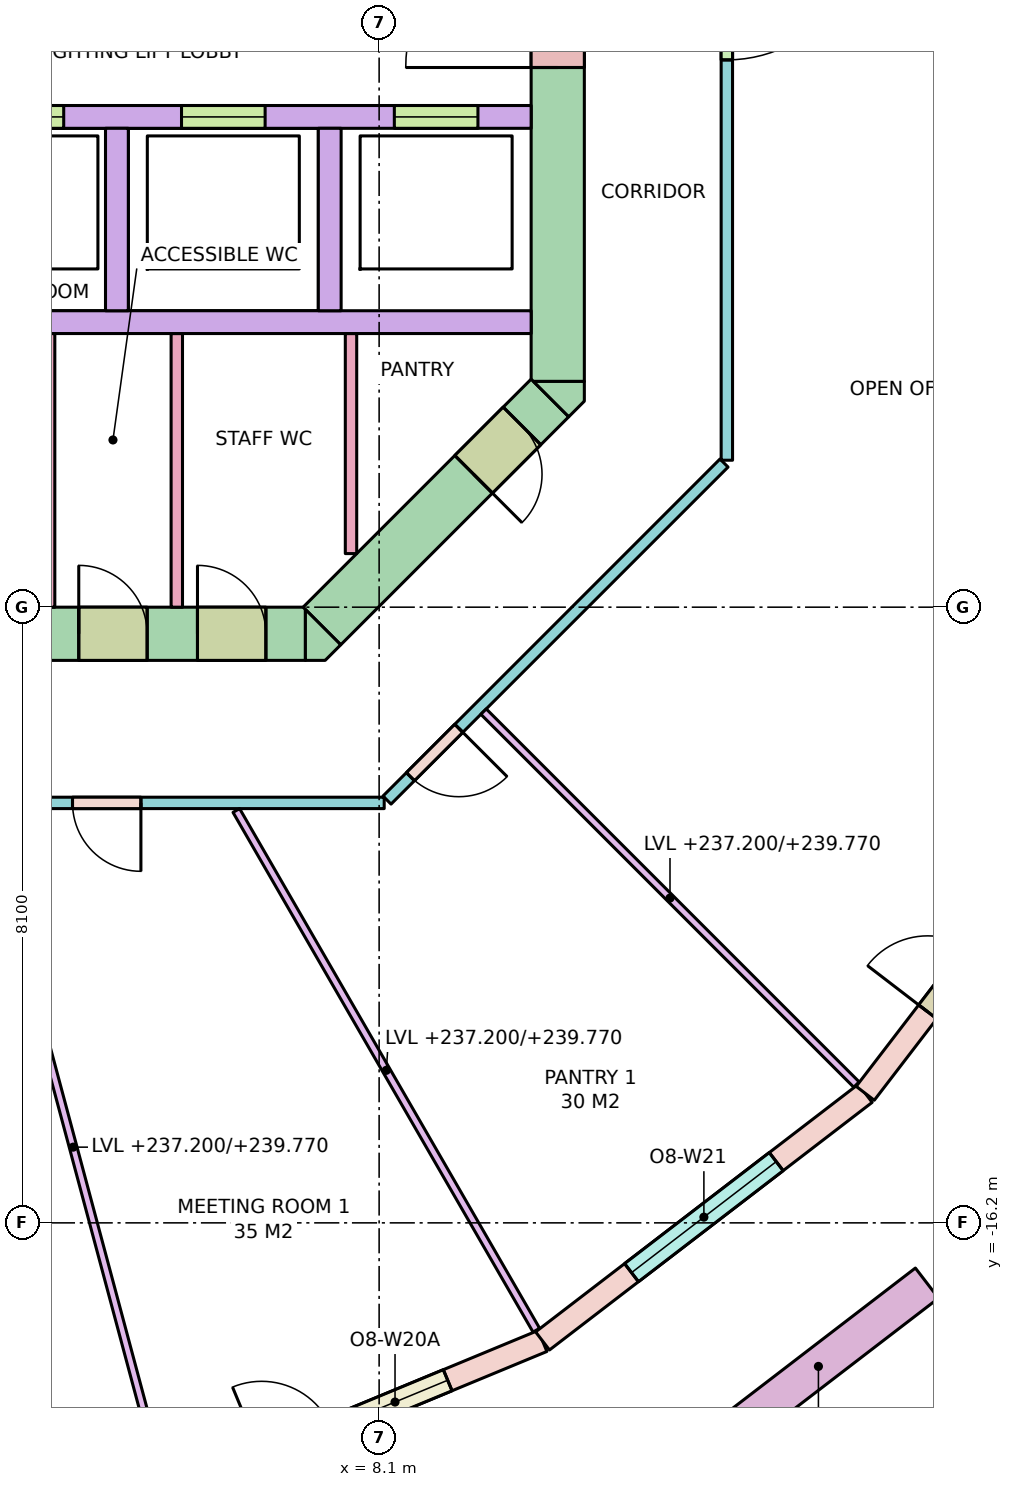
"""IFC4 building model, lengths in metres.
Left out: names, types, materials, properties, quantities, classifications, styles, units other than length and angle.
Written with IfcOpenShell. Run it as: python <this file> out.ifc"""

import sys

from ifc_helpers import new_model, si_unit, direction, frame, frame_2d, origin, place, context, subcontext, project, spatial, polyline, rectangle, outline, extrude, element, fill, save


model = new_model("IFC4")
c1 = context("Model", 3, precision=1e-05, world=origin(), true_north=direction((0.0, 1.0)))
c2 = subcontext(c1, "Body", "Model", "MODEL_VIEW")
j1 = project(units=[si_unit("LENGTHUNIT", "METRE"), si_unit("PLANEANGLEUNIT", "RADIAN")], contexts=[c1])
p1 = place(None, origin())
s1 = spatial("IfcSite", under=j1, at=p1, CompositionType="ELEMENT")
p2 = place(p1, origin())
s2 = spatial("IfcBuilding", under=s1, at=p2, CompositionType="ELEMENT")
p3 = place(p2, frame((0.0, 0.0, 237.2)))
s3 = spatial("IfcBuildingStorey", under=s2, at=p3, CompositionType="ELEMENT", Elevation=237.2)
p4 = place(p3, frame((-7.13, -8.45, -0.28), z_axis=(0.0, 0.0, 1.0), x_axis=(1.0, 0.0, 0.0)))
e1 = element("IfcWall", 1, at=p4, inside=s3, PredefinedType="SHEAR", context=c2, shape_type="SweptSolid", body=[
    extrude(rectangle(XDim=14.26, YDim=0.7, at=frame_2d((7.13, 0.0))), origin(), (0.0, 0.0, 1.0), 3.7),
])
p5 = place(p4, frame((8.08, 0.0, 0.28)))
e2 = element("IfcOpeningElement", 2, at=p5, cuts=e1, PredefinedType="OPENING", context=c2, shape_type="SweptSolid", body=[
    extrude(rectangle(XDim=0.7, YDim=2.1, at=frame_2d((0.35, 1.05))), frame((0.0, 0.36, 0.0), z_axis=(0.0, -1.0, 0.0), x_axis=(1.0, 0.0, 0.0)), (0.0, 0.0, 1.0), 0.72),
])
p6 = place(p4, frame((6.205, 0.0, 0.28)))
e3 = element("IfcOpeningElement", 3, at=p6, cuts=e1, PredefinedType="OPENING", context=c2, shape_type="SweptSolid", body=[
    extrude(rectangle(XDim=0.9, YDim=2.1, at=frame_2d((0.45, 1.05))), frame((0.0, 0.36, 0.0), z_axis=(0.0, -1.0, 0.0), x_axis=(1.0, 0.0, 0.0)), (0.0, 0.0, 1.0), 0.72),
])
p7 = place(p4, frame((9.521, 0.0, 0.28)))
e4 = element("IfcOpeningElement", 4, at=p7, cuts=e1, PredefinedType="OPENING", context=c2, shape_type="SweptSolid", body=[
    extrude(rectangle(XDim=0.9, YDim=2.1, at=frame_2d((0.45, 1.05))), frame((0.0, 0.36, 0.0), z_axis=(0.0, -1.0, 0.0), x_axis=(1.0, 0.0, 0.0)), (0.0, 0.0, 1.0), 0.72),
])
p8 = place(p4, frame((11.278, 0.0, 0.28)))
e5 = element("IfcOpeningElement", 5, at=p8, cuts=e1, PredefinedType="OPENING", context=c2, shape_type="SweptSolid", body=[
    extrude(rectangle(XDim=0.9, YDim=2.1, at=frame_2d((0.45, 1.05))), frame((0.0, 0.36, 0.0), z_axis=(0.0, -1.0, 0.0), x_axis=(1.0, 0.0, 0.0)), (0.0, 0.0, 1.0), 0.72),
])
p9 = place(p4, frame((12.84, 0.0, 0.28)))
e6 = element("IfcOpeningElement", 6, at=p9, cuts=e1, PredefinedType="OPENING", context=c2, shape_type="SweptSolid", body=[
    extrude(rectangle(XDim=0.9, YDim=2.1, at=frame_2d((0.45, 1.05))), frame((0.0, 0.36, 0.0), z_axis=(0.0, -1.0, 0.0), x_axis=(1.0, 0.0, 0.0)), (0.0, 0.0, 1.0), 0.72),
])
p10 = place(p3, frame((10.45, -5.13, -0.28), z_axis=(0.0, 0.0, 1.0), x_axis=(0.0, 1.0, 0.0)))
e7 = element("IfcWall", 7, at=p10, inside=s3, PredefinedType="SHEAR", context=c2, shape_type="SweptSolid", body=[
    extrude(rectangle(XDim=10.26, YDim=0.7, at=frame_2d((5.13, 0.0))), origin(), (0.0, 0.0, 1.0), 3.7),
])
p11 = place(p10, frame((4.13, 0.0, 0.28)))
e8 = element("IfcOpeningElement", 8, at=p11, cuts=e7, PredefinedType="OPENING", context=c2, shape_type="SweptSolid", body=[
    extrude(rectangle(XDim=2.0, YDim=2.1, at=frame_2d((1.0, 1.05))), frame((0.0, 0.36, 0.0), z_axis=(0.0, -1.0, 0.0), x_axis=(1.0, 0.0, 0.0)), (0.0, 0.0, 1.0), 0.72),
])
p12 = place(p3, frame((10.347, -5.347, -0.28), z_axis=(0.0, 0.0, 1.0), x_axis=(-0.707106781187, -0.707106781187, 0.0)))
e9 = element("IfcWall", 9, at=p12, inside=s3, PredefinedType="SHEAR", context=c2, shape_type="SweptSolid", body=[
    extrude(rectangle(XDim=4.243, YDim=0.7, at=frame_2d((2.121, 0.0))), origin(), (0.0, 0.0, 1.0), 3.7),
])
p13 = place(p12, frame((0.52, 0.0, 0.28)))
e10 = element("IfcOpeningElement", 10, at=p13, cuts=e9, PredefinedType="OPENING", context=c2, shape_type="SweptSolid", body=[
    extrude(rectangle(XDim=0.9, YDim=2.1, at=frame_2d((0.45, 1.05))), frame((0.0, 0.36, 0.0), z_axis=(0.0, -1.0, 0.0), x_axis=(1.0, 0.0, 0.0)), (0.0, 0.0, 1.0), 0.72),
])
p14 = place(p3, frame((0.0, 0.0, -0.28)))
e11 = element("IfcWall", 11, at=p14, inside=s3, PredefinedType="SHEAR", context=c2, shape_type="SweptSolid", body=[
    extrude(outline(polyline([(7.39, -8.8), (7.13, -8.8), (7.13, -8.8), (7.13, -8.13), (7.595, -8.595), (7.595, -8.595), (7.595, -8.595), (7.39, -8.8)])), origin(), (0.0, 0.0, 1.0), 3.7),
])
p15 = place(p3, frame((0.0, 0.0, -0.28)))
e12 = element("IfcWall", 12, at=p15, inside=s3, PredefinedType="SHEAR", context=c2, shape_type="SweptSolid", body=[
    extrude(outline(polyline([(10.8, -5.39), (10.595, -5.595), (10.595, -5.595), (10.595, -5.595), (10.13, -5.13), (10.8, -5.13), (10.8, -5.13), (10.8, -5.39)])), origin(), (0.0, 0.0, 1.0), 3.7),
])
p16 = place(p3, frame((2.0, -4.35, 0.0), z_axis=(0.0, 0.0, 1.0), x_axis=(1.0, 0.0, 0.0)))
e13 = element("IfcWall", 13, at=p16, inside=s3, PredefinedType="SOLIDWALL", context=c2, shape_type="SweptSolid", body=[
    extrude(rectangle(XDim=8.1, YDim=0.3, at=frame_2d((4.05, 0.0))), origin(), (0.0, 0.0, 1.0), 3.42),
])
p17 = place(p3, frame((2.0, -1.65, 0.0), z_axis=(0.0, 0.0, 1.0), x_axis=(1.0, 0.0, 0.0)))
e14 = element("IfcWall", 14, at=p17, inside=s3, PredefinedType="SOLIDWALL", context=c2, shape_type="SweptSolid", body=[
    extrude(rectangle(XDim=8.1, YDim=0.3, at=frame_2d((4.05, 0.0))), origin(), (0.0, 0.0, 1.0), 3.42),
])
p18 = place(p17, frame((0.85, 0.0, 0.0)))
e15 = element("IfcOpeningElement", 15, at=p18, cuts=e14, PredefinedType="OPENING", context=c2, shape_type="SweptSolid", body=[
    extrude(rectangle(XDim=1.1, YDim=2.1, at=frame_2d((0.55, 1.05))), frame((0.0, 0.16, 0.0), z_axis=(0.0, -1.0, 0.0), x_axis=(1.0, 0.0, 0.0)), (0.0, 0.0, 1.0), 0.32),
])
p19 = place(p17, frame((3.5, 0.0, 0.0)))
e16 = element("IfcOpeningElement", 16, at=p19, cuts=e14, PredefinedType="OPENING", context=c2, shape_type="SweptSolid", body=[
    extrude(rectangle(XDim=1.1, YDim=2.1, at=frame_2d((0.55, 1.05))), frame((0.0, 0.16, 0.0), z_axis=(0.0, -1.0, 0.0), x_axis=(1.0, 0.0, 0.0)), (0.0, 0.0, 1.0), 0.32),
])
p20 = place(p17, frame((6.3, 0.0, 0.0)))
e17 = element("IfcOpeningElement", 17, at=p20, cuts=e14, PredefinedType="OPENING", context=c2, shape_type="SweptSolid", body=[
    extrude(rectangle(XDim=1.1, YDim=2.1, at=frame_2d((0.55, 1.05))), frame((0.0, 0.16, 0.0), z_axis=(0.0, -1.0, 0.0), x_axis=(1.0, 0.0, 0.0)), (0.0, 0.0, 1.0), 0.32),
])
for number, where, z_axis, x_axis in (
    (18, (4.65, -4.2, 0.0), (0.0, 0.0, 1.0), (0.0, 1.0, 0.0)),
    (19, (7.45, -4.2, 0.0), (0.0, 0.0, 1.0), (0.0, 1.0, 0.0)),
):
    element("IfcWall", number, at=place(p3, frame(where, z_axis=z_axis, x_axis=x_axis)), inside=s3, PredefinedType="SOLIDWALL", context=c2, shape_type="SweptSolid", body=[
        extrude(rectangle(XDim=2.4, YDim=0.3, at=frame_2d((1.2, 0.0))), origin(), (0.0, 0.0, 1.0), 3.42),
    ])
p21 = place(p3, frame((5.306, -19.802, 0.0), z_axis=(0.0, 0.0, 1.0), x_axis=(0.923867255172, 0.382713071139, 0.0)))
e20 = element("IfcWall", 20, at=p21, inside=s3, PredefinedType="STANDARD", context=c2, shape_type="SweptSolid", body=[
    extrude(rectangle(XDim=5.352, YDim=0.3, at=frame_2d((2.676, 0.0))), origin(), (0.0, 0.0, 1.0), 3.42),
])
p22 = place(p21, frame((1.351, 0.0, 0.0)))
e21 = element("IfcOpeningElement", 21, at=p22, cuts=e20, PredefinedType="OPENING", context=c2, shape_type="SweptSolid", body=[
    extrude(rectangle(XDim=1.0, YDim=2.4, at=frame_2d((0.5, 1.2))), frame((0.0, 0.16, 0.0), z_axis=(0.0, -1.0, 0.0), x_axis=(1.0, 0.0, 0.0)), (0.0, 0.0, 1.0), 0.32),
])
p23 = place(p21, frame((2.501, 0.0, 0.8)))
e22 = element("IfcOpeningElement", 22, at=p23, cuts=e20, PredefinedType="OPENING", context=c2, shape_type="SweptSolid", body=[
    extrude(rectangle(XDim=1.5, YDim=2.4, at=frame_2d((0.75, 1.2))), frame((0.0, 0.16, 0.0), z_axis=(0.0, -1.0, 0.0), x_axis=(1.0, 0.0, 0.0)), (0.0, 0.0, 1.0), 0.32),
])
p24 = place(p3, frame((10.25, -17.753, 0.0), z_axis=(0.0, 0.0, 1.0), x_axis=(0.793349293227, 0.60876670321, 0.0)))
e23 = element("IfcWall", 23, at=p24, inside=s3, PredefinedType="STANDARD", context=c2, shape_type="SweptSolid", body=[
    extrude(rectangle(XDim=5.352, YDim=0.3, at=frame_2d((2.676, 0.0))), origin(), (0.0, 0.0, 1.0), 3.42),
])
p25 = place(p24, frame((1.476, 0.0, 0.8)))
e24 = element("IfcOpeningElement", 24, at=p25, cuts=e23, PredefinedType="OPENING", context=c2, shape_type="SweptSolid", body=[
    extrude(rectangle(XDim=2.4, YDim=2.4, at=frame_2d((1.2, 1.2))), frame((0.0, 0.16, 0.0), z_axis=(0.0, -1.0, 0.0), x_axis=(1.0, 0.0, 0.0)), (0.0, 0.0, 1.0), 0.32),
])
p26 = place(p3, frame((14.496, -14.496, 0.0), z_axis=(0.0, 0.0, 1.0), x_axis=(0.60876670321, 0.793349293227, 0.0)))
e25 = element("IfcWall", 25, at=p26, inside=s3, PredefinedType="STANDARD", context=c2, shape_type="SweptSolid", body=[
    extrude(rectangle(XDim=5.352, YDim=0.3, at=frame_2d((2.676, 0.0))), origin(), (0.0, 0.0, 1.0), 3.42),
])
p27 = place(p26, frame((1.351, 0.0, 0.0)))
e26 = element("IfcOpeningElement", 26, at=p27, cuts=e25, PredefinedType="OPENING", context=c2, shape_type="SweptSolid", body=[
    extrude(rectangle(XDim=1.0, YDim=2.4, at=frame_2d((0.5, 1.2))), frame((0.0, 0.16, 0.0), z_axis=(0.0, -1.0, 0.0), x_axis=(1.0, 0.0, 0.0)), (0.0, 0.0, 1.0), 0.32),
])
p28 = place(p26, frame((2.501, 0.0, 0.8)))
e27 = element("IfcOpeningElement", 27, at=p28, cuts=e25, PredefinedType="OPENING", context=c2, shape_type="SweptSolid", body=[
    extrude(rectangle(XDim=1.5, YDim=2.4, at=frame_2d((0.75, 1.2))), frame((0.0, 0.16, 0.0), z_axis=(0.0, -1.0, 0.0), x_axis=(1.0, 0.0, 0.0)), (0.0, 0.0, 1.0), 0.32),
])
p29 = place(p3, frame((12.452, -19.184, 0.0), z_axis=(0.0, 0.0, 1.0), x_axis=(0.793384730612, 0.608720518162, 0.0)))
e28 = element("IfcWall", 28, at=p29, inside=s3, PredefinedType="PARAPET", context=c2, shape_type="SweptSolid", body=[
    extrude(rectangle(XDim=3.6, YDim=0.5, at=frame_2d((1.8, 0.0))), origin(), (0.0, 0.0, 1.0), 0.9),
])
for number, where, z_axis, x_axis in (
    (29, (3.758, -8.1, 0.0), (0.0, 0.0, 1.0), (0.0, 1.0, 0.0)),
    (30, (5.438, -8.1, 0.0), (0.0, 0.0, 1.0), (0.0, 1.0, 0.0)),
):
    element("IfcWall", number, at=place(p3, frame(where, z_axis=z_axis, x_axis=x_axis)), inside=s3, PredefinedType="PARTITIONING", context=c2, shape_type="SweptSolid", body=[
        extrude(rectangle(XDim=3.6, YDim=0.15, at=frame_2d((1.8, 0.0))), origin(), (0.0, 0.0, 1.0), 3.42),
    ])
p30 = place(p3, frame((7.73, -7.395, 0.0), z_axis=(0.0, 0.0, 1.0), x_axis=(0.0, 1.0, 0.0)))
e31 = element("IfcWall", 31, at=p30, inside=s3, PredefinedType="PARTITIONING", context=c2, shape_type="SweptSolid", body=[
    extrude(rectangle(XDim=2.895, YDim=0.15, at=frame_2d((1.448, 0.0))), origin(), (0.0, 0.0, 1.0), 3.42),
])
p31 = place(p3, frame((12.638, -6.204, 0.0), z_axis=(0.0, 0.0, 1.0), x_axis=(-0.707106781187, -0.707106781187, 0.0)))
e32 = element("IfcWall", 32, at=p31, inside=s3, PredefinedType="PARTITIONING", context=c2, shape_type="SweptSolid", body=[
    extrude(rectangle(XDim=6.271, YDim=0.15, at=frame_2d((3.135, 0.0))), origin(), (0.0, 0.0, 1.0), 2.57),
])
p32 = place(p31, frame((4.935, 0.0, 0.0)))
e33 = element("IfcOpeningElement", 33, at=p32, cuts=e32, PredefinedType="OPENING", context=c2, shape_type="SweptSolid", body=[
    extrude(rectangle(XDim=0.9, YDim=2.1, at=frame_2d((0.45, 1.05))), frame((0.0, 0.085, 0.0), z_axis=(0.0, -1.0, 0.0), x_axis=(1.0, 0.0, 0.0)), (0.0, 0.0, 1.0), 0.17),
])
p33 = place(p3, frame((8.167, -10.675, 0.0), z_axis=(0.0, 0.0, 1.0), x_axis=(-1.0, 0.0, 0.0)))
e34 = element("IfcWall", 34, at=p33, inside=s3, PredefinedType="PARTITIONING", context=c2, shape_type="SweptSolid", body=[
    extrude(rectangle(XDim=16.333, YDim=0.15, at=frame_2d((8.167, 0.0))), origin(), (0.0, 0.0, 1.0), 2.57),
])
p34 = place(p33, frame((12.755, 0.0, 0.0)))
e35 = element("IfcOpeningElement", 35, at=p34, cuts=e34, PredefinedType="OPENING", context=c2, shape_type="SweptSolid", body=[
    extrude(rectangle(XDim=1.8, YDim=2.1, at=frame_2d((0.9, 1.05))), frame((0.0, 0.085, 0.0), z_axis=(0.0, -1.0, 0.0), x_axis=(1.0, 0.0, 0.0)), (0.0, 0.0, 1.0), 0.17),
])
p35 = place(p33, frame((9.098, 0.0, 0.0)))
e36 = element("IfcOpeningElement", 36, at=p35, cuts=e34, PredefinedType="OPENING", context=c2, shape_type="SweptSolid", body=[
    extrude(rectangle(XDim=1.0, YDim=2.1, at=frame_2d((0.5, 1.05))), frame((0.0, 0.085, 0.0), z_axis=(0.0, -1.0, 0.0), x_axis=(1.0, 0.0, 0.0)), (0.0, 0.0, 1.0), 0.17),
])
p36 = place(p33, frame((6.285, 0.0, 0.0)))
e37 = element("IfcOpeningElement", 37, at=p36, cuts=e34, PredefinedType="OPENING", context=c2, shape_type="SweptSolid", body=[
    extrude(rectangle(XDim=0.9, YDim=2.1, at=frame_2d((0.45, 1.05))), frame((0.0, 0.085, 0.0), z_axis=(0.0, -1.0, 0.0), x_axis=(1.0, 0.0, 0.0)), (0.0, 0.0, 1.0), 0.17),
])
p37 = place(p33, frame((3.201, 0.0, 0.0)))
e38 = element("IfcOpeningElement", 38, at=p37, cuts=e34, PredefinedType="OPENING", context=c2, shape_type="SweptSolid", body=[
    extrude(rectangle(XDim=0.9, YDim=2.1, at=frame_2d((0.45, 1.05))), frame((0.0, 0.085, 0.0), z_axis=(0.0, -1.0, 0.0), x_axis=(1.0, 0.0, 0.0)), (0.0, 0.0, 1.0), 0.17),
])
p38 = place(p3, frame((12.675, 6.167, 0.0), z_axis=(0.0, 0.0, 1.0), x_axis=(0.0, -1.0, 0.0)))
e39 = element("IfcWall", 39, at=p38, inside=s3, PredefinedType="PARTITIONING", context=c2, shape_type="SweptSolid", body=[
    extrude(rectangle(XDim=12.333, YDim=0.15, at=frame_2d((6.167, 0.0))), origin(), (0.0, 0.0, 1.0), 2.57),
])
p39 = place(p38, frame((5.267, 0.0, 0.0)))
e40 = element("IfcOpeningElement", 40, at=p39, cuts=e39, PredefinedType="OPENING", context=c2, shape_type="SweptSolid", body=[
    extrude(rectangle(XDim=1.8, YDim=2.1, at=frame_2d((0.9, 1.05))), frame((0.0, 0.085, 0.0), z_axis=(0.0, -1.0, 0.0), x_axis=(1.0, 0.0, 0.0)), (0.0, 0.0, 1.0), 0.17),
])
p40 = place(p3, frame((2.884, -10.764, 0.0), z_axis=(0.0, 0.0, 1.0), x_axis=(0.258811310764, -0.965927898666, 0.0)))
e41 = element("IfcWall", 41, at=p40, inside=s3, PredefinedType="PARTITIONING", context=c2, shape_type="SweptSolid", body=[
    extrude(rectangle(XDim=9.193, YDim=0.1, at=frame_2d((4.596, 0.0))), origin(), (0.0, 0.0, 1.0), 2.57),
])
p41 = place(p3, frame((6.221, -10.775, 0.0), z_axis=(0.0, 0.0, 1.0), x_axis=(0.500016891966, -0.866015650984, 0.0)))
e42 = element("IfcWall", 42, at=p41, inside=s3, PredefinedType="PARTITIONING", context=c2, shape_type="SweptSolid", body=[
    extrude(rectangle(XDim=7.895, YDim=0.1, at=frame_2d((3.948, 0.0))), origin(), (0.0, 0.0, 1.0), 2.57),
])
p42 = place(p3, frame((9.474, -9.474, 0.0), z_axis=(0.0, 0.0, 1.0), x_axis=(0.707106781187, -0.707106781187, 0.0)))
e43 = element("IfcWall", 43, at=p42, inside=s3, PredefinedType="PARTITIONING", context=c2, shape_type="SweptSolid", body=[
    extrude(rectangle(XDim=6.938, YDim=0.1, at=frame_2d((3.469, 0.0))), origin(), (0.0, 0.0, 1.0), 2.57),
])
p43 = place(p23, origin())
e44 = element("IfcWindow", 44, at=p43, inside=s3, PartitioningType="SINGLE_PANEL", PredefinedType="WINDOW", context=c2, shape_type="SweptSolid", body=[
    extrude(rectangle(XDim=1.5, YDim=2.4, at=frame_2d((0.75, 1.2))), frame((0.0, 0.03, 0.0), z_axis=(0.0, -1.0, 0.0), x_axis=(1.0, 0.0, 0.0)), (0.0, 0.0, 1.0), 0.06),
])
fill(e22, e44)
p44 = place(p25, origin())
e45 = element("IfcWindow", 45, at=p44, inside=s3, PartitioningType="SINGLE_PANEL", PredefinedType="WINDOW", context=c2, shape_type="SweptSolid", body=[
    extrude(rectangle(XDim=2.4, YDim=2.4, at=frame_2d((1.2, 1.2))), frame((0.0, 0.03, 0.0), z_axis=(0.0, -1.0, 0.0), x_axis=(1.0, 0.0, 0.0)), (0.0, 0.0, 1.0), 0.06),
])
fill(e24, e45)
p45 = place(p27, origin())
e46 = element("IfcDoor", 46, at=p45, inside=s3, OperationType="SINGLE_SWING_LEFT", PredefinedType="DOOR", context=c2, shape_type="SweptSolid", body=[
    extrude(rectangle(XDim=1.0, YDim=2.4, at=frame_2d((0.5, 1.2))), frame((0.0, 0.025, 0.0), z_axis=(0.0, -1.0, 0.0), x_axis=(1.0, 0.0, 0.0)), (0.0, 0.0, 1.0), 0.05),
])
fill(e26, e46)
p46 = place(p18, origin())
e47 = element("IfcDoor", 47, at=p46, inside=s3, OperationType="DOUBLE_DOOR_SLIDING", PredefinedType="DOOR", context=c2, shape_type="SweptSolid", body=[
    extrude(rectangle(XDim=1.1, YDim=2.1, at=frame_2d((0.55, 1.05))), frame((0.0, 0.025, 0.0), z_axis=(0.0, -1.0, 0.0), x_axis=(1.0, 0.0, 0.0)), (0.0, 0.0, 1.0), 0.05),
])
fill(e15, e47)
p47 = place(p19, origin())
e48 = element("IfcDoor", 48, at=p47, inside=s3, OperationType="DOUBLE_DOOR_SLIDING", PredefinedType="DOOR", context=c2, shape_type="SweptSolid", body=[
    extrude(rectangle(XDim=1.1, YDim=2.1, at=frame_2d((0.55, 1.05))), frame((0.0, 0.025, 0.0), z_axis=(0.0, -1.0, 0.0), x_axis=(1.0, 0.0, 0.0)), (0.0, 0.0, 1.0), 0.05),
])
fill(e16, e48)
p48 = place(p20, origin())
e49 = element("IfcDoor", 49, at=p48, inside=s3, OperationType="DOUBLE_DOOR_SLIDING", PredefinedType="DOOR", context=c2, shape_type="SweptSolid", body=[
    extrude(rectangle(XDim=1.1, YDim=2.1, at=frame_2d((0.55, 1.05))), frame((0.0, 0.025, 0.0), z_axis=(0.0, -1.0, 0.0), x_axis=(1.0, 0.0, 0.0)), (0.0, 0.0, 1.0), 0.05),
])
fill(e17, e49)
p49 = place(p11, origin())
e50 = element("IfcDoor", 50, at=p49, inside=s3, OperationType="DOUBLE_DOOR_SINGLE_SWING", PredefinedType="DOOR", context=c2, shape_type="SweptSolid", body=[
    extrude(rectangle(XDim=2.0, YDim=2.1, at=frame_2d((1.0, 1.05))), frame((0.0, 0.025, 0.0), z_axis=(0.0, -1.0, 0.0), x_axis=(1.0, 0.0, 0.0)), (0.0, 0.0, 1.0), 0.05),
])
fill(e8, e50)
p50 = place(p8, origin())
e51 = element("IfcDoor", 51, at=p50, inside=s3, OperationType="SINGLE_SWING_LEFT", PredefinedType="DOOR", context=c2, shape_type="SweptSolid", body=[
    extrude(rectangle(XDim=0.9, YDim=2.1, at=frame_2d((0.45, 1.05))), frame((0.0, 0.025, 0.0), z_axis=(0.0, -1.0, 0.0), x_axis=(1.0, 0.0, 0.0)), (0.0, 0.0, 1.0), 0.05),
])
fill(e5, e51)
p51 = place(p9, origin())
e52 = element("IfcDoor", 52, at=p51, inside=s3, OperationType="SINGLE_SWING_LEFT", PredefinedType="DOOR", context=c2, shape_type="SweptSolid", body=[
    extrude(rectangle(XDim=0.9, YDim=2.1, at=frame_2d((0.45, 1.05))), frame((0.0, 0.025, 0.0), z_axis=(0.0, -1.0, 0.0), x_axis=(1.0, 0.0, 0.0)), (0.0, 0.0, 1.0), 0.05),
])
fill(e6, e52)
p52 = place(p13, origin())
e53 = element("IfcDoor", 53, at=p52, inside=s3, OperationType="SINGLE_SWING_RIGHT", PredefinedType="DOOR", context=c2, shape_type="SweptSolid", body=[
    extrude(rectangle(XDim=0.9, YDim=2.1, at=frame_2d((0.45, 1.05))), frame((0.0, 0.025, 0.0), z_axis=(0.0, -1.0, 0.0), x_axis=(1.0, 0.0, 0.0)), (0.0, 0.0, 1.0), 0.05),
])
fill(e10, e53)
p53 = place(p37, origin())
e54 = element("IfcDoor", 54, at=p53, inside=s3, OperationType="SINGLE_SWING_LEFT", PredefinedType="DOOR", context=c2, shape_type="SweptSolid", body=[
    extrude(rectangle(XDim=0.9, YDim=2.1, at=frame_2d((0.45, 1.05))), frame((0.0, 0.025, 0.0), z_axis=(0.0, -1.0, 0.0), x_axis=(1.0, 0.0, 0.0)), (0.0, 0.0, 1.0), 0.05),
])
fill(e38, e54)
p54 = place(p32, origin())
e55 = element("IfcDoor", 55, at=p54, inside=s3, OperationType="SINGLE_SWING_LEFT", PredefinedType="DOOR", context=c2, shape_type="SweptSolid", body=[
    extrude(rectangle(XDim=0.9, YDim=2.1, at=frame_2d((0.45, 1.05))), frame((0.0, 0.025, 0.0), z_axis=(0.0, -1.0, 0.0), x_axis=(1.0, 0.0, 0.0)), (0.0, 0.0, 1.0), 0.05),
])
fill(e33, e55)
p55 = place(p39, origin())
e56 = element("IfcDoor", 56, at=p55, inside=s3, OperationType="DOUBLE_DOOR_SINGLE_SWING", PredefinedType="DOOR", context=c2, shape_type="SweptSolid", body=[
    extrude(rectangle(XDim=1.8, YDim=2.1, at=frame_2d((0.9, 1.05))), frame((0.0, 0.025, 0.0), z_axis=(0.0, -1.0, 0.0), x_axis=(1.0, 0.0, 0.0)), (0.0, 0.0, 1.0), 0.05),
])
fill(e40, e56)
save(model, sys.argv[1])
